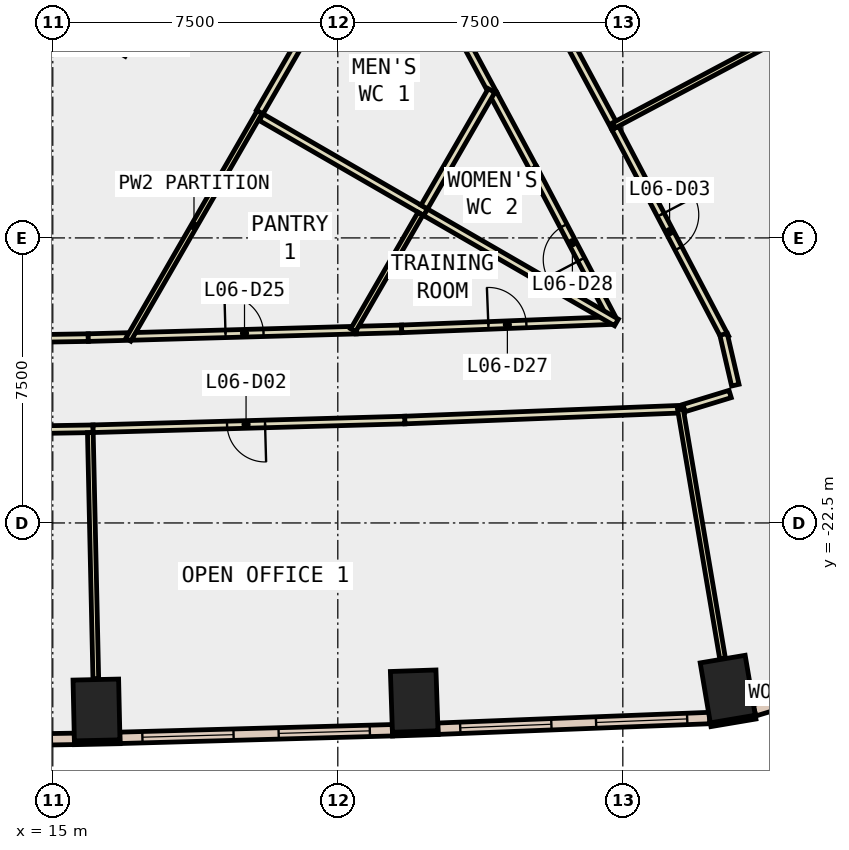
"""IFC4 building model, lengths in metres.
Left out: names, types, materials, properties, quantities, classifications, styles, units other than length and angle.
Written with IfcOpenShell. Run it as: python <this file> out.ifc"""

import sys

from ifc_helpers import new_model, si_unit, direction, frame, frame_2d, origin, origin_2d, place, context, subcontext, project, spatial, rectangle, extrude, element, fill, save


model = new_model("IFC4")
c1 = context("Model", 3, precision=1e-05, world=origin(), true_north=direction((0.0, 1.0)))
c2 = subcontext(c1, "Body", "Model", "MODEL_VIEW")
j1 = project(units=[si_unit("LENGTHUNIT", "METRE"), si_unit("PLANEANGLEUNIT", "RADIAN")], contexts=[c1])
p1 = place(None, origin())
s1 = spatial("IfcSite", under=j1, at=p1, CompositionType="ELEMENT")
p2 = place(p1, origin())
s2 = spatial("IfcBuilding", under=s1, at=p2, CompositionType="ELEMENT")
p3 = place(p2, frame((0.0, 0.0, 35.0)))
s3 = spatial("IfcBuildingStorey", under=s2, at=p3, CompositionType="ELEMENT", Elevation=35.0)
for number, where, z_axis, x_axis in (
    (1, (16.15, -27.421, -0.6), (0.0, 0.0, 1.0), (1.0, 0.022, 0.0)),
    (2, (24.51, -27.188, -0.6), (0.0, 0.0, 1.0), (0.999, 0.034, 0.0)),
    (3, (32.761, -26.871, -0.6), (0.0, 0.0, 1.0), (0.986, 0.167, 0.0)),
):
    element("IfcColumn", number, at=place(p3, frame(where, z_axis=z_axis, x_axis=x_axis)), inside=s3, PredefinedType="COLUMN", context=c2, shape_type="SweptSolid", body=[
        extrude(rectangle(XDim=1.2, YDim=1.6, at=origin_2d()), origin(), (0.0, 0.0, 1.0), 4.4),
    ])
p4 = place(p3, frame((9.31, -5.375, -0.6), z_axis=(0.0, 0.0, 1.0), x_axis=(0.866017533419, -0.500013631625, 0.0)))
e4 = element("IfcWall", 4, at=p4, inside=s3, PredefinedType="SHEAR", context=c2, shape_type="SweptSolid", body=[
    extrude(rectangle(XDim=9.0, YDim=0.8, at=frame_2d((4.5, 0.0))), origin(), (0.0, 0.0, 1.0), 4.4),
])
p5 = place(p3, frame((15.569, -28.284, 0.0), z_axis=(0.0, 0.0, 1.0), x_axis=(0.99976752127, 0.021561618973, 0.0)))
e5 = element("IfcWall", 5, at=p5, inside=s3, PredefinedType="STANDARD", context=c2, shape_type="SweptSolid", body=[
    extrude(rectangle(XDim=1.2, YDim=0.1, at=frame_2d((0.6, 0.0))), origin(), (0.0, 0.0, 1.0), 3.8),
])
for number, where, z_axis, x_axis in (
    (6, (23.939, -28.057, 0.0), (0.0, 0.0, 1.0), (0.999, 0.033, 0.0)),
    (7, (32.311, -27.809, 0.0), (0.0, 0.0, 1.0), (0.986, 0.167, 0.0)),
):
    element("IfcWall", number, at=place(p3, frame(where, z_axis=z_axis, x_axis=x_axis)), inside=s3, PredefinedType="STANDARD", context=c2, shape_type="SweptSolid", body=[
        extrude(rectangle(XDim=1.2, YDim=0.1, at=frame_2d((0.6, 0.0))), origin(), (0.0, 0.0, 1.0), 3.8),
    ])
p6 = place(p3, frame((8.398, -28.298, 0.0), z_axis=(0.0, 0.0, 1.0), x_axis=(0.999866467443, 0.016341581408, 0.0)))
e8 = element("IfcWall", 8, at=p6, inside=s3, PredefinedType="STANDARD", context=c2, shape_type="SweptSolid", body=[
    extrude(rectangle(XDim=7.171, YDim=0.3, at=frame_2d((3.585, 0.0))), origin(), (0.0, 0.0, 1.0), 3.8),
])
p7 = place(p6, frame((0.593, 0.0, 0.9)))
e9 = element("IfcOpeningElement", 9, at=p7, cuts=e8, PredefinedType="OPENING", context=c2, shape_type="SweptSolid", body=[
    extrude(rectangle(XDim=2.4, YDim=2.6, at=frame_2d((1.2, 1.3))), frame((0.0, 0.16, 0.0), z_axis=(0.0, -1.0, 0.0), x_axis=(1.0, 0.0, 0.0)), (0.0, 0.0, 1.0), 0.32),
])
p8 = place(p6, frame((4.178, 0.0, 0.9)))
e10 = element("IfcOpeningElement", 10, at=p8, cuts=e8, PredefinedType="OPENING", context=c2, shape_type="SweptSolid", body=[
    extrude(rectangle(XDim=2.4, YDim=2.6, at=frame_2d((1.2, 1.3))), frame((0.0, 0.16, 0.0), z_axis=(0.0, -1.0, 0.0), x_axis=(1.0, 0.0, 0.0)), (0.0, 0.0, 1.0), 0.32),
])
p9 = place(p3, frame((16.765, -28.154, 0.0), z_axis=(0.0, 0.0, 1.0), x_axis=(0.999611502654, 0.02787191709, 0.0)))
e11 = element("IfcWall", 11, at=p9, inside=s3, PredefinedType="STANDARD", context=c2, shape_type="SweptSolid", body=[
    extrude(rectangle(XDim=7.174, YDim=0.3, at=frame_2d((3.587, 0.0))), origin(), (0.0, 0.0, 1.0), 3.8),
])
p10 = place(p9, frame((0.593, 0.0, 0.9)))
e12 = element("IfcOpeningElement", 12, at=p10, cuts=e11, PredefinedType="OPENING", context=c2, shape_type="SweptSolid", body=[
    extrude(rectangle(XDim=2.4, YDim=2.6, at=frame_2d((1.2, 1.3))), frame((0.0, 0.16, 0.0), z_axis=(0.0, -1.0, 0.0), x_axis=(1.0, 0.0, 0.0)), (0.0, 0.0, 1.0), 0.32),
])
p11 = place(p9, frame((4.18, 0.0, 0.9)))
e13 = element("IfcOpeningElement", 13, at=p11, cuts=e11, PredefinedType="OPENING", context=c2, shape_type="SweptSolid", body=[
    extrude(rectangle(XDim=2.4, YDim=2.6, at=frame_2d((1.2, 1.3))), frame((0.0, 0.16, 0.0), z_axis=(0.0, -1.0, 0.0), x_axis=(1.0, 0.0, 0.0)), (0.0, 0.0, 1.0), 0.32),
])
p12 = place(p3, frame((25.134, -27.914, 0.0), z_axis=(0.0, 0.0, 1.0), x_axis=(0.999228146648, 0.039282450878, 0.0)))
e14 = element("IfcWall", 14, at=p12, inside=s3, PredefinedType="STANDARD", context=c2, shape_type="SweptSolid", body=[
    extrude(rectangle(XDim=7.154, YDim=0.3, at=frame_2d((3.577, 0.0))), origin(), (0.0, 0.0, 1.0), 3.8),
])
p13 = place(p12, frame((0.588, 0.0, 0.9)))
e15 = element("IfcOpeningElement", 15, at=p13, cuts=e14, PredefinedType="OPENING", context=c2, shape_type="SweptSolid", body=[
    extrude(rectangle(XDim=2.4, YDim=2.6, at=frame_2d((1.2, 1.3))), frame((0.0, 0.16, 0.0), z_axis=(0.0, -1.0, 0.0), x_axis=(1.0, 0.0, 0.0)), (0.0, 0.0, 1.0), 0.32),
])
p14 = place(p12, frame((4.165, 0.0, 0.9)))
e16 = element("IfcOpeningElement", 16, at=p14, cuts=e14, PredefinedType="OPENING", context=c2, shape_type="SweptSolid", body=[
    extrude(rectangle(XDim=2.4, YDim=2.6, at=frame_2d((1.2, 1.3))), frame((0.0, 0.16, 0.0), z_axis=(0.0, -1.0, 0.0), x_axis=(1.0, 0.0, 0.0)), (0.0, 0.0, 1.0), 0.32),
])
p15 = place(p3, frame((33.464, -27.433, 0.0), z_axis=(0.0, 0.0, 1.0), x_axis=(0.95648967224, 0.291766185322, 0.0)))
e17 = element("IfcWall", 17, at=p15, inside=s3, PredefinedType="STANDARD", context=c2, shape_type="SweptSolid", body=[
    extrude(rectangle(XDim=3.181, YDim=0.3, at=frame_2d((1.591, 0.0))), origin(), (0.0, 0.0, 1.0), 3.8),
])
p16 = place(p15, frame((0.891, 0.0, 0.9)))
e18 = element("IfcOpeningElement", 18, at=p16, cuts=e17, PredefinedType="OPENING", context=c2, shape_type="SweptSolid", body=[
    extrude(rectangle(XDim=1.4, YDim=2.6, at=frame_2d((0.7, 1.3))), frame((0.0, 0.16, 0.0), z_axis=(0.0, -1.0, 0.0), x_axis=(1.0, 0.0, 0.0)), (0.0, 0.0, 1.0), 0.32),
])
p17 = place(p3, frame((7.7, -17.758, 0.0), z_axis=(0.0, 0.0, 1.0), x_axis=(0.999865574926, 0.016396099485, 0.0)))
e19 = element("IfcWall", 19, at=p17, inside=s3, PredefinedType="PARTITIONING", context=c2, shape_type="SweptSolid", body=[
    extrude(rectangle(XDim=8.234, YDim=0.2, at=frame_2d((4.117, 0.0))), origin(), (0.0, 0.0, 1.0), 3.8),
])
p18 = place(p3, frame((15.933, -17.623, 0.0), z_axis=(0.0, 0.0, 1.0), x_axis=(0.999627129061, 0.027305729179, 0.0)))
e20 = element("IfcWall", 20, at=p18, inside=s3, PredefinedType="PARTITIONING", context=c2, shape_type="SweptSolid", body=[
    extrude(rectangle(XDim=1.028, YDim=0.2, at=frame_2d((0.514, 0.0))), origin(), (0.0, 0.0, 1.0), 3.8),
])
p19 = place(p3, frame((17.111, -17.591, 0.0), z_axis=(0.0, 0.0, 1.0), x_axis=(0.99960470841, 0.028114532261, 0.0)))
e21 = element("IfcWall", 21, at=p19, inside=s3, PredefinedType="PARTITIONING", context=c2, shape_type="SweptSolid", body=[
    extrude(rectangle(XDim=5.87, YDim=0.2, at=frame_2d((2.935, 0.0))), origin(), (0.0, 0.0, 1.0), 3.8),
])
p20 = place(p19, frame((2.435, 0.0, 0.0)))
e22 = element("IfcOpeningElement", 22, at=p20, cuts=e21, PredefinedType="OPENING", context=c2, shape_type="SweptSolid", body=[
    extrude(rectangle(XDim=1.0, YDim=2.1, at=frame_2d((0.5, 1.05))), frame((0.0, 0.11, 0.0), z_axis=(0.0, -1.0, 0.0), x_axis=(1.0, 0.0, 0.0)), (0.0, 0.0, 1.0), 0.22),
])
p21 = place(p3, frame((26.592, -11.211, 0.0), z_axis=(0.0, 0.0, 1.0), x_axis=(-0.473737860011, 0.880665907136, 0.0)))
e23 = element("IfcWall", 23, at=p21, inside=s3, PredefinedType="PARTITIONING", context=c2, shape_type="SweptSolid", body=[
    extrude(rectangle(XDim=4.988, YDim=0.2, at=frame_2d((2.494, 0.0))), origin(), (0.0, 0.0, 1.0), 3.8),
])
p22 = place(p21, frame((1.994, 0.0, 0.0)))
e24 = element("IfcOpeningElement", 24, at=p22, cuts=e23, PredefinedType="OPENING", context=c2, shape_type="SweptSolid", body=[
    extrude(rectangle(XDim=1.0, YDim=2.1, at=frame_2d((0.5, 1.05))), frame((0.0, 0.11, 0.0), z_axis=(0.0, -1.0, 0.0), x_axis=(1.0, 0.0, 0.0)), (0.0, 0.0, 1.0), 0.22),
])
p23 = place(p3, frame((22.979, -17.426, 0.0), z_axis=(0.0, 0.0, 1.0), x_axis=(0.999623609507, 0.027434272674, 0.0)))
e25 = element("IfcWall", 25, at=p23, inside=s3, PredefinedType="PARTITIONING", context=c2, shape_type="SweptSolid", body=[
    extrude(rectangle(XDim=1.201, YDim=0.2, at=frame_2d((0.601, 0.0))), origin(), (0.0, 0.0, 1.0), 3.8),
])
p24 = place(p3, frame((24.18, -17.393, 0.0), z_axis=(0.0, 0.0, 1.0), x_axis=(0.999226657848, 0.039320303228, 0.0)))
e26 = element("IfcWall", 26, at=p24, inside=s3, PredefinedType="PARTITIONING", context=c2, shape_type="SweptSolid", body=[
    extrude(rectangle(XDim=5.57, YDim=0.2, at=frame_2d((2.785, 0.0))), origin(), (0.0, 0.0, 1.0), 3.8),
])
p25 = place(p24, frame((2.284, 0.0, 0.0)))
e27 = element("IfcOpeningElement", 27, at=p25, cuts=e26, PredefinedType="OPENING", context=c2, shape_type="SweptSolid", body=[
    extrude(rectangle(XDim=1.0, YDim=2.1, at=frame_2d((0.5, 1.05))), frame((0.0, 0.11, 0.0), z_axis=(0.0, -1.0, 0.0), x_axis=(1.0, 0.0, 0.0)), (0.0, 0.0, 1.0), 0.22),
])
p26 = place(p3, frame((29.702, -17.085, 0.0), z_axis=(0.0, 0.0, 1.0), x_axis=(-0.464998228159, 0.88531161057, 0.0)))
e28 = element("IfcWall", 28, at=p26, inside=s3, PredefinedType="PARTITIONING", context=c2, shape_type="SweptSolid", body=[
    extrude(rectangle(XDim=4.426, YDim=0.2, at=frame_2d((2.213, 0.0))), origin(), (0.0, 0.0, 1.0), 3.8),
])
p27 = place(p26, frame((1.713, 0.0, 0.0)))
e29 = element("IfcOpeningElement", 29, at=p27, cuts=e28, PredefinedType="OPENING", context=c2, shape_type="SweptSolid", body=[
    extrude(rectangle(XDim=1.0, YDim=2.1, at=frame_2d((0.5, 1.05))), frame((0.0, 0.11, 0.0), z_axis=(0.0, -1.0, 0.0), x_axis=(1.0, 0.0, 0.0)), (0.0, 0.0, 1.0), 0.22),
])
p28 = place(p3, frame((27.644, -13.167, 0.0), z_axis=(0.0, 0.0, 1.0), x_axis=(-0.473660574093, 0.880707477287, 0.0)))
e30 = element("IfcWall", 30, at=p28, inside=s3, PredefinedType="PARTITIONING", context=c2, shape_type="SweptSolid", body=[
    extrude(rectangle(XDim=2.221, YDim=0.2, at=frame_2d((1.11, 0.0))), origin(), (0.0, 0.0, 1.0), 3.8),
])
p29 = place(p3, frame((16.061, -20.022, 0.0), z_axis=(0.0, 0.0, 1.0), x_axis=(-0.999865858466, -0.016378799504, 0.0)))
e31 = element("IfcWall", 31, at=p29, inside=s3, PredefinedType="PARTITIONING", context=c2, shape_type="SweptSolid", body=[
    extrude(rectangle(XDim=8.362, YDim=0.2, at=frame_2d((4.181, 0.0))), origin(), (0.0, 0.0, 1.0), 3.8),
])
p30 = place(p29, frame((3.681, 0.0, 0.0)))
e32 = element("IfcOpeningElement", 32, at=p30, cuts=e31, PredefinedType="OPENING", context=c2, shape_type="SweptSolid", body=[
    extrude(rectangle(XDim=1.0, YDim=2.1, at=frame_2d((0.5, 1.05))), frame((0.0, 0.11, 0.0), z_axis=(0.0, -1.0, 0.0), x_axis=(1.0, 0.0, 0.0)), (0.0, 0.0, 1.0), 0.22),
])
p31 = place(p3, frame((31.615, -19.503, 0.0), z_axis=(0.0, 0.0, 1.0), x_axis=(-0.999228381006, -0.039276489048, 0.0)))
e33 = element("IfcWall", 33, at=p31, inside=s3, PredefinedType="PARTITIONING", context=c2, shape_type="SweptSolid", body=[
    extrude(rectangle(XDim=7.36, YDim=0.2, at=frame_2d((3.68, 0.0))), origin(), (0.0, 0.0, 1.0), 3.8),
])
p32 = place(p3, frame((24.261, -19.792, 0.0), z_axis=(0.0, 0.0, 1.0), x_axis=(-0.999610256124, -0.027916587377, 0.0)))
e34 = element("IfcWall", 34, at=p32, inside=s3, PredefinedType="PARTITIONING", context=c2, shape_type="SweptSolid", body=[
    extrude(rectangle(XDim=8.203, YDim=0.2, at=frame_2d((4.102, 0.0))), origin(), (0.0, 0.0, 1.0), 3.8),
])
p33 = place(p32, frame((3.677, 0.0, 0.0)))
e35 = element("IfcOpeningElement", 35, at=p33, cuts=e34, PredefinedType="OPENING", context=c2, shape_type="SweptSolid", body=[
    extrude(rectangle(XDim=1.0, YDim=2.1, at=frame_2d((0.5, 1.05))), frame((0.0, 0.11, 0.0), z_axis=(0.0, -1.0, 0.0), x_axis=(1.0, 0.0, 0.0)), (0.0, 0.0, 1.0), 0.22),
])
p34 = place(p3, frame((29.799, -12.107, 0.0), z_axis=(0.0, 0.0, 1.0), x_axis=(0.464767882002, -0.885432558617, 0.0)))
e36 = element("IfcWall", 36, at=p34, inside=s3, PredefinedType="PARTITIONING", context=c2, shape_type="SweptSolid", body=[
    extrude(rectangle(XDim=6.233, YDim=0.2, at=frame_2d((3.117, 0.0))), origin(), (0.0, 0.0, 1.0), 3.8),
])
p35 = place(p34, frame((2.58, 0.0, 0.0)))
e37 = element("IfcOpeningElement", 37, at=p35, cuts=e36, PredefinedType="OPENING", context=c2, shape_type="SweptSolid", body=[
    extrude(rectangle(XDim=1.0, YDim=2.1, at=frame_2d((0.5, 1.05))), frame((0.0, 0.11, 0.0), z_axis=(0.0, -1.0, 0.0), x_axis=(1.0, 0.0, 0.0)), (0.0, 0.0, 1.0), 0.22),
])
p36 = place(p3, frame((32.65, -17.538, 0.0), z_axis=(0.0, 0.0, 1.0), x_axis=(0.226081445763, -0.974108402531, 0.0)))
e38 = element("IfcWall", 38, at=p36, inside=s3, PredefinedType="PARTITIONING", context=c2, shape_type="SweptSolid", body=[
    extrude(rectangle(XDim=1.371, YDim=0.2, at=frame_2d((0.686, 0.0))), origin(), (0.0, 0.0, 1.0), 3.8),
])
p37 = place(p3, frame((32.824, -19.107, 0.0), z_axis=(0.0, 0.0, 1.0), x_axis=(-0.956459113118, -0.291866347723, 0.0)))
e39 = element("IfcWall", 39, at=p37, inside=s3, PredefinedType="PARTITIONING", context=c2, shape_type="SweptSolid", body=[
    extrude(rectangle(XDim=1.268, YDim=0.2, at=frame_2d((0.634, 0.0))), origin(), (0.0, 0.0, 1.0), 3.8),
])
p38 = place(p3, frame((26.337, -5.671, 0.0), z_axis=(0.0, 0.0, 1.0), x_axis=(0.473794961698, -0.880635187958, 0.0)))
e40 = element("IfcWall", 40, at=p38, inside=s3, PredefinedType="PARTITIONING", context=c2, shape_type="SweptSolid", body=[
    extrude(rectangle(XDim=7.307, YDim=0.2, at=frame_2d((3.654, 0.0))), origin(), (0.0, 0.0, 1.0), 3.8),
])
p39 = place(p38, frame((3.154, 0.0, 0.0)))
e41 = element("IfcOpeningElement", 41, at=p39, cuts=e40, PredefinedType="OPENING", context=c2, shape_type="SweptSolid", body=[
    extrude(rectangle(XDim=1.0, YDim=2.1, at=frame_2d((0.5, 1.05))), frame((0.0, 0.11, 0.0), z_axis=(0.0, -1.0, 0.0), x_axis=(1.0, 0.0, 0.0)), (0.0, 0.0, 1.0), 0.22),
])
p40 = place(p3, frame((20.445, -11.688, 0.0), z_axis=(0.0, 0.0, 1.0), x_axis=(-0.500010633597, -0.866019264387, 0.0)))
e42 = element("IfcWall", 42, at=p40, inside=s3, PredefinedType="PARTITIONING", context=c2, shape_type="SweptSolid", body=[
    extrude(rectangle(XDim=6.918, YDim=0.15, at=frame_2d((3.459, 0.0))), origin(), (0.0, 0.0, 1.0), 3.8),
])
p41 = place(p3, frame((22.857, -7.51, 0.0), z_axis=(0.0, 0.0, 1.0), x_axis=(-0.499954636112, -0.866051593054, 0.0)))
e43 = element("IfcWall", 43, at=p41, inside=s3, PredefinedType="PARTITIONING", context=c2, shape_type="SweptSolid", body=[
    extrude(rectangle(XDim=4.824, YDim=0.2, at=frame_2d((2.412, 0.0))), origin(), (0.0, 0.0, 1.0), 3.8),
])
p42 = place(p3, frame((20.482, -11.824, 0.0), z_axis=(0.0, 0.0, 1.0), x_axis=(0.866022959057, -0.500004234368, 0.0)))
e44 = element("IfcWall", 44, at=p42, inside=s3, PredefinedType="PARTITIONING", context=c2, shape_type="SweptSolid", body=[
    extrude(rectangle(XDim=5.0, YDim=0.2, at=frame_2d((2.5, 0.0))), origin(), (0.0, 0.0, 1.0), 3.8),
])
p43 = place(p3, frame((24.675, -14.362, 0.0), z_axis=(0.0, 0.0, 1.0), x_axis=(-0.500187988959, -0.865916841101, 0.0)))
e45 = element("IfcWall", 45, at=p43, inside=s3, PredefinedType="PARTITIONING", context=c2, shape_type="SweptSolid", body=[
    extrude(rectangle(XDim=3.541, YDim=0.15, at=frame_2d((1.771, 0.0))), origin(), (0.0, 0.0, 1.0), 3.8),
])
p44 = place(p3, frame((26.545, -11.123, 0.0), z_axis=(0.0, 0.0, 1.0), x_axis=(-0.500100605862, -0.865967311171, 0.0)))
e46 = element("IfcWall", 46, at=p44, inside=s3, PredefinedType="PARTITIONING", context=c2, shape_type="SweptSolid", body=[
    extrude(rectangle(XDim=3.539, YDim=0.2, at=frame_2d((1.77, 0.0))), origin(), (0.0, 0.0, 1.0), 3.8),
])
p45 = place(p3, frame((24.811, -14.326, 0.0), z_axis=(0.0, 0.0, 1.0), x_axis=(0.866076195524, -0.499912015806, 0.0)))
e47 = element("IfcWall", 47, at=p45, inside=s3, PredefinedType="PARTITIONING", context=c2, shape_type="SweptSolid", body=[
    extrude(rectangle(XDim=5.797, YDim=0.2, at=frame_2d((2.899, 0.0))), origin(), (0.0, 0.0, 1.0), 3.8),
])
p46 = place(p3, frame((15.988, -20.123, 0.0), z_axis=(0.0, 0.0, 1.0), x_axis=(0.022230127358, -0.999752880185, 0.0)))
e48 = element("IfcWall", 48, at=p46, inside=s3, PredefinedType="PARTITIONING", context=c2, shape_type="SweptSolid", body=[
    extrude(rectangle(XDim=6.48, YDim=0.15, at=frame_2d((3.24, 0.0))), origin(), (0.0, 0.0, 1.0), 3.8),
])
p47 = place(p3, frame((31.515, -19.506, 0.0), z_axis=(0.0, 0.0, 1.0), x_axis=(0.166785823947, -0.985993148521, 0.0)))
e49 = element("IfcWall", 49, at=p47, inside=s3, PredefinedType="PARTITIONING", context=c2, shape_type="SweptSolid", body=[
    extrude(rectangle(XDim=6.65, YDim=0.15, at=frame_2d((3.325, 0.0))), origin(), (0.0, 0.0, 1.0), 3.8),
])
p48 = place(p3, frame((29.764, -12.04, 0.0), z_axis=(0.0, 0.0, 1.0), x_axis=(0.883018657393, 0.469337885426, 0.0)))
e50 = element("IfcWall", 50, at=p48, inside=s3, PredefinedType="PARTITIONING", context=c2, shape_type="SweptSolid", body=[
    extrude(rectangle(XDim=6.58, YDim=0.15, at=frame_2d((3.29, 0.0))), origin(), (0.0, 0.0, 1.0), 3.8),
])
p49 = place(p10, origin())
e51 = element("IfcWindow", 51, at=p49, inside=s3, PartitioningType="SINGLE_PANEL", PredefinedType="WINDOW", context=c2, shape_type="SweptSolid", body=[
    extrude(rectangle(XDim=2.4, YDim=2.6, at=frame_2d((1.2, 1.3))), frame((0.0, 0.03, 0.0), z_axis=(0.0, -1.0, 0.0), x_axis=(1.0, 0.0, 0.0)), (0.0, 0.0, 1.0), 0.06),
])
fill(e12, e51)
p50 = place(p11, origin())
e52 = element("IfcWindow", 52, at=p50, inside=s3, PartitioningType="SINGLE_PANEL", PredefinedType="WINDOW", context=c2, shape_type="SweptSolid", body=[
    extrude(rectangle(XDim=2.4, YDim=2.6, at=frame_2d((1.2, 1.3))), frame((0.0, 0.03, 0.0), z_axis=(0.0, -1.0, 0.0), x_axis=(1.0, 0.0, 0.0)), (0.0, 0.0, 1.0), 0.06),
])
fill(e13, e52)
p51 = place(p13, origin())
e53 = element("IfcWindow", 53, at=p51, inside=s3, PartitioningType="SINGLE_PANEL", PredefinedType="WINDOW", context=c2, shape_type="SweptSolid", body=[
    extrude(rectangle(XDim=2.4, YDim=2.6, at=frame_2d((1.2, 1.3))), frame((0.0, 0.03, 0.0), z_axis=(0.0, -1.0, 0.0), x_axis=(1.0, 0.0, 0.0)), (0.0, 0.0, 1.0), 0.06),
])
fill(e15, e53)
p52 = place(p14, origin())
e54 = element("IfcWindow", 54, at=p52, inside=s3, PartitioningType="SINGLE_PANEL", PredefinedType="WINDOW", context=c2, shape_type="SweptSolid", body=[
    extrude(rectangle(XDim=2.4, YDim=2.6, at=frame_2d((1.2, 1.3))), frame((0.0, 0.03, 0.0), z_axis=(0.0, -1.0, 0.0), x_axis=(1.0, 0.0, 0.0)), (0.0, 0.0, 1.0), 0.06),
])
fill(e16, e54)
p53 = place(p33, origin())
e55 = element("IfcDoor", 55, at=p53, inside=s3, OperationType="SINGLE_SWING_RIGHT", PredefinedType="DOOR", context=c2, shape_type="SweptSolid", body=[
    extrude(rectangle(XDim=1.0, YDim=2.1, at=frame_2d((0.5, 1.05))), frame((0.0, 0.025, 0.0), z_axis=(0.0, -1.0, 0.0), x_axis=(1.0, 0.0, 0.0)), (0.0, 0.0, 1.0), 0.05),
])
fill(e35, e55)
p54 = place(p35, origin())
e56 = element("IfcDoor", 56, at=p54, inside=s3, OperationType="SINGLE_SWING_LEFT", PredefinedType="DOOR", context=c2, shape_type="SweptSolid", body=[
    extrude(rectangle(XDim=1.0, YDim=2.1, at=frame_2d((0.5, 1.05))), frame((0.0, 0.025, 0.0), z_axis=(0.0, -1.0, 0.0), x_axis=(1.0, 0.0, 0.0)), (0.0, 0.0, 1.0), 0.05),
])
fill(e37, e56)
p55 = place(p20, origin())
e57 = element("IfcDoor", 57, at=p55, inside=s3, OperationType="SINGLE_SWING_LEFT", PredefinedType="DOOR", context=c2, shape_type="SweptSolid", body=[
    extrude(rectangle(XDim=1.0, YDim=2.1, at=frame_2d((0.5, 1.05))), frame((0.0, 0.025, 0.0), z_axis=(0.0, -1.0, 0.0), x_axis=(1.0, 0.0, 0.0)), (0.0, 0.0, 1.0), 0.05),
])
fill(e22, e57)
p56 = place(p25, origin())
e58 = element("IfcDoor", 58, at=p56, inside=s3, OperationType="SINGLE_SWING_LEFT", PredefinedType="DOOR", context=c2, shape_type="SweptSolid", body=[
    extrude(rectangle(XDim=1.0, YDim=2.1, at=frame_2d((0.5, 1.05))), frame((0.0, 0.025, 0.0), z_axis=(0.0, -1.0, 0.0), x_axis=(1.0, 0.0, 0.0)), (0.0, 0.0, 1.0), 0.05),
])
fill(e27, e58)
p57 = place(p27, origin())
e59 = element("IfcDoor", 59, at=p57, inside=s3, OperationType="SINGLE_SWING_LEFT", PredefinedType="DOOR", context=c2, shape_type="SweptSolid", body=[
    extrude(rectangle(XDim=1.0, YDim=2.1, at=frame_2d((0.5, 1.05))), frame((0.0, 0.025, 0.0), z_axis=(0.0, -1.0, 0.0), x_axis=(1.0, 0.0, 0.0)), (0.0, 0.0, 1.0), 0.05),
])
fill(e29, e59)
save(model, sys.argv[1])
